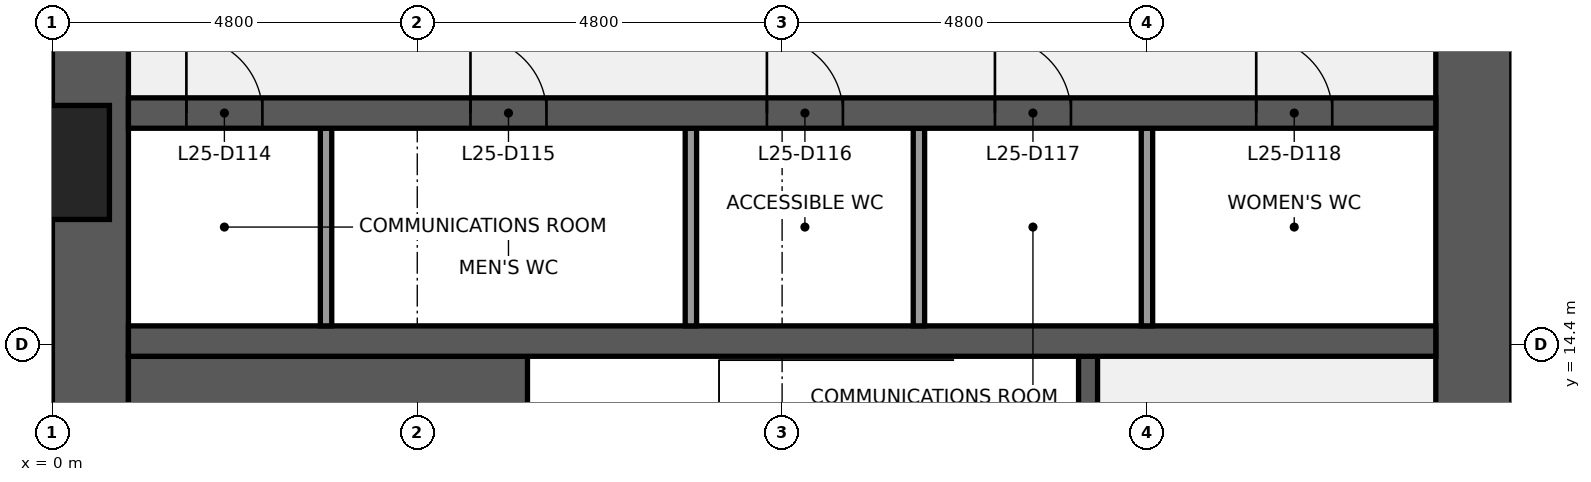
"""IFC4 building model, lengths in metres.
Left out: names, types, materials, properties, quantities, classifications, styles, units other than length and angle.
Written with IfcOpenShell. Run it as: python <this file> out.ifc"""

import sys

from ifc_helpers import new_model, si_unit, direction, frame, frame_2d, origin, place, context, subcontext, project, spatial, rectangle, extrude, element, fill, save


model = new_model("IFC4")
c1 = context("Model", 3, precision=1e-05, world=origin(), true_north=direction((0.0, 1.0)))
c2 = subcontext(c1, "Body", "Model", "MODEL_VIEW")
j1 = project(units=[si_unit("LENGTHUNIT", "METRE"), si_unit("PLANEANGLEUNIT", "RADIAN")], contexts=[c1])
p1 = place(None, origin())
s1 = spatial("IfcSite", under=j1, at=p1, CompositionType="ELEMENT")
p2 = place(p1, origin())
s2 = spatial("IfcBuilding", under=s1, at=p2, CompositionType="ELEMENT")
p3 = place(p2, frame((0.0, 0.0, 120.1)))
s3 = spatial("IfcBuildingStorey", under=s2, at=p3, CompositionType="ELEMENT", Elevation=120.1)
p4 = place(p3, frame((0.5, 9.6, 0.0), z_axis=(0.0, 0.0, 1.0), x_axis=(0.0, 1.0, 0.0)))
e1 = element("IfcWall", 1, at=p4, inside=s3, PredefinedType="SHEAR", context=c2, shape_type="SweptSolid", body=[
    extrude(rectangle(XDim=28.8, YDim=1.0, at=frame_2d((14.4, 0.0))), origin(), (0.0, 0.0, 1.0), 3.84),
])
p5 = place(p4, frame((8.85, 0.0, 0.9)))
e2 = element("IfcOpeningElement", 2, at=p5, cuts=e1, PredefinedType="OPENING", context=c2, shape_type="SweptSolid", body=[
    extrude(rectangle(XDim=1.5, YDim=1.5, at=frame_2d((0.75, 0.75))), frame((0.0, 0.51, 0.0), z_axis=(0.0, -1.0, 0.0), x_axis=(1.0, 0.0, 0.0)), (0.0, 0.0, 1.0), 1.02),
])
p6 = place(p4, frame((18.45, 0.0, 0.9)))
e3 = element("IfcOpeningElement", 3, at=p6, cuts=e1, PredefinedType="OPENING", context=c2, shape_type="SweptSolid", body=[
    extrude(rectangle(XDim=1.5, YDim=1.5, at=frame_2d((0.75, 0.75))), frame((0.0, 0.51, 0.0), z_axis=(0.0, -1.0, 0.0), x_axis=(1.0, 0.0, 0.0)), (0.0, 0.0, 1.0), 1.02),
])
p7 = place(p3, frame((18.7, 38.4, 0.0), z_axis=(0.0, 0.0, 1.0), x_axis=(0.0, -1.0, 0.0)))
e4 = element("IfcWall", 4, at=p7, inside=s3, PredefinedType="SHEAR", context=c2, shape_type="SweptSolid", body=[
    extrude(rectangle(XDim=28.8, YDim=1.0, at=frame_2d((14.4, 0.0))), origin(), (0.0, 0.0, 1.0), 3.84),
])
p8 = place(p7, frame((18.3, 0.0, 0.0)))
e5 = element("IfcOpeningElement", 5, at=p8, cuts=e4, PredefinedType="OPENING", context=c2, shape_type="SweptSolid", body=[
    extrude(rectangle(XDim=1.8, YDim=2.1, at=frame_2d((0.9, 1.05))), frame((0.0, 0.51, 0.0), z_axis=(0.0, -1.0, 0.0), x_axis=(1.0, 0.0, 0.0)), (0.0, 0.0, 1.0), 1.02),
])
p9 = place(p7, frame((8.7, 0.0, 0.0)))
e6 = element("IfcOpeningElement", 6, at=p9, cuts=e4, PredefinedType="OPENING", context=c2, shape_type="SweptSolid", body=[
    extrude(rectangle(XDim=1.8, YDim=2.1, at=frame_2d((0.9, 1.05))), frame((0.0, 0.51, 0.0), z_axis=(0.0, -1.0, 0.0), x_axis=(1.0, 0.0, 0.0)), (0.0, 0.0, 1.0), 1.02),
])
p10 = place(p3, frame((1.0, 12.425, 0.0), z_axis=(0.0, 0.0, 1.0), x_axis=(1.0, 0.0, 0.0)))
e7 = element("IfcWall", 7, at=p10, inside=s3, PredefinedType="SHEAR", context=c2, shape_type="SweptSolid", body=[
    extrude(rectangle(XDim=5.25, YDim=3.65, at=frame_2d((2.625, 0.0))), origin(), (0.0, 0.0, 1.0), 3.84),
])
p11 = place(p3, frame((13.625, 10.8, 0.0), z_axis=(0.0, 0.0, 1.0), x_axis=(0.0, 1.0, 0.0)))
e8 = element("IfcWall", 8, at=p11, inside=s3, PredefinedType="SHEAR", context=c2, shape_type="SweptSolid", body=[
    extrude(rectangle(XDim=3.45, YDim=0.25, at=frame_2d((1.725, 0.0))), origin(), (0.0, 0.0, 1.0), 3.84),
])
p12 = place(p11, frame((1.175, 0.0, 0.0)))
e9 = element("IfcOpeningElement", 9, at=p12, cuts=e8, PredefinedType="OPENING", context=c2, shape_type="SweptSolid", body=[
    extrude(rectangle(XDim=1.1, YDim=2.1, at=frame_2d((0.55, 1.05))), frame((0.0, 0.135, 0.0), z_axis=(0.0, -1.0, 0.0), x_axis=(1.0, 0.0, 0.0)), (0.0, 0.0, 1.0), 0.27),
])
p13 = place(p3, frame((1.0, 14.45, 0.0), z_axis=(0.0, 0.0, 1.0), x_axis=(1.0, 0.0, 0.0)))
e10 = element("IfcWall", 10, at=p13, inside=s3, PredefinedType="SHEAR", context=c2, shape_type="SweptSolid", body=[
    extrude(rectangle(XDim=17.2, YDim=0.4, at=frame_2d((8.6, 0.0))), origin(), (0.0, 0.0, 1.0), 3.84),
])
for number, where, z_axis, x_axis in (
    (11, (3.6, 14.65, 0.0), (0.0, 0.0, 1.0), (0.0, 1.0, 0.0)),
    (12, (8.4, 14.65, 0.0), (0.0, 0.0, 1.0), (0.0, 1.0, 0.0)),
    (13, (11.4, 14.65, 0.0), (0.0, 0.0, 1.0), (0.0, 1.0, 0.0)),
    (14, (14.4, 14.65, 0.0), (0.0, 0.0, 1.0), (0.0, 1.0, 0.0)),
):
    element("IfcWall", number, at=place(p3, frame(where, z_axis=z_axis, x_axis=x_axis)), inside=s3, PredefinedType="PARTITIONING", context=c2, shape_type="SweptSolid", body=[
        extrude(rectangle(XDim=2.6, YDim=0.15, at=frame_2d((1.3, 0.0))), origin(), (0.0, 0.0, 1.0), 3.84),
    ])
p14 = place(p3, frame((1.0, 17.45, 0.0), z_axis=(0.0, 0.0, 1.0), x_axis=(1.0, 0.0, 0.0)))
e15 = element("IfcWall", 15, at=p14, inside=s3, PredefinedType="SHEAR", context=c2, shape_type="SweptSolid", body=[
    extrude(rectangle(XDim=17.2, YDim=0.4, at=frame_2d((8.6, 0.0))), origin(), (0.0, 0.0, 1.0), 3.84),
])
p15 = place(p14, frame((0.762, 0.0, 0.0)))
e16 = element("IfcOpeningElement", 16, at=p15, cuts=e15, PredefinedType="OPENING", context=c2, shape_type="SweptSolid", body=[
    extrude(rectangle(XDim=1.0, YDim=2.1, at=frame_2d((0.5, 1.05))), frame((0.0, 0.21, 0.0), z_axis=(0.0, -1.0, 0.0), x_axis=(1.0, 0.0, 0.0)), (0.0, 0.0, 1.0), 0.42),
])
p16 = place(p14, frame((4.5, 0.0, 0.0)))
e17 = element("IfcOpeningElement", 17, at=p16, cuts=e15, PredefinedType="OPENING", context=c2, shape_type="SweptSolid", body=[
    extrude(rectangle(XDim=1.0, YDim=2.1, at=frame_2d((0.5, 1.05))), frame((0.0, 0.21, 0.0), z_axis=(0.0, -1.0, 0.0), x_axis=(1.0, 0.0, 0.0)), (0.0, 0.0, 1.0), 0.42),
])
p17 = place(p14, frame((8.4, 0.0, 0.0)))
e18 = element("IfcOpeningElement", 18, at=p17, cuts=e15, PredefinedType="OPENING", context=c2, shape_type="SweptSolid", body=[
    extrude(rectangle(XDim=1.0, YDim=2.1, at=frame_2d((0.5, 1.05))), frame((0.0, 0.21, 0.0), z_axis=(0.0, -1.0, 0.0), x_axis=(1.0, 0.0, 0.0)), (0.0, 0.0, 1.0), 0.42),
])
p18 = place(p14, frame((11.4, 0.0, 0.0)))
e19 = element("IfcOpeningElement", 19, at=p18, cuts=e15, PredefinedType="OPENING", context=c2, shape_type="SweptSolid", body=[
    extrude(rectangle(XDim=1.0, YDim=2.1, at=frame_2d((0.5, 1.05))), frame((0.0, 0.21, 0.0), z_axis=(0.0, -1.0, 0.0), x_axis=(1.0, 0.0, 0.0)), (0.0, 0.0, 1.0), 0.42),
])
p19 = place(p14, frame((14.837, 0.0, 0.0)))
e20 = element("IfcOpeningElement", 20, at=p19, cuts=e15, PredefinedType="OPENING", context=c2, shape_type="SweptSolid", body=[
    extrude(rectangle(XDim=1.0, YDim=2.1, at=frame_2d((0.5, 1.05))), frame((0.0, 0.21, 0.0), z_axis=(0.0, -1.0, 0.0), x_axis=(1.0, 0.0, 0.0)), (0.0, 0.0, 1.0), 0.42),
])
p20 = place(p15, origin())
e21 = element("IfcDoor", 21, at=p20, inside=s3, OperationType="SINGLE_SWING_LEFT", PredefinedType="DOOR", context=c2, shape_type="SweptSolid", body=[
    extrude(rectangle(XDim=1.0, YDim=2.1, at=frame_2d((0.5, 1.05))), frame((0.0, 0.025, 0.0), z_axis=(0.0, -1.0, 0.0), x_axis=(1.0, 0.0, 0.0)), (0.0, 0.0, 1.0), 0.05),
])
fill(e16, e21)
p21 = place(p16, origin())
e22 = element("IfcDoor", 22, at=p21, inside=s3, OperationType="SINGLE_SWING_LEFT", PredefinedType="DOOR", context=c2, shape_type="SweptSolid", body=[
    extrude(rectangle(XDim=1.0, YDim=2.1, at=frame_2d((0.5, 1.05))), frame((0.0, 0.025, 0.0), z_axis=(0.0, -1.0, 0.0), x_axis=(1.0, 0.0, 0.0)), (0.0, 0.0, 1.0), 0.05),
])
fill(e17, e22)
p22 = place(p17, origin())
e23 = element("IfcDoor", 23, at=p22, inside=s3, OperationType="SINGLE_SWING_LEFT", PredefinedType="DOOR", context=c2, shape_type="SweptSolid", body=[
    extrude(rectangle(XDim=1.0, YDim=2.1, at=frame_2d((0.5, 1.05))), frame((0.0, 0.025, 0.0), z_axis=(0.0, -1.0, 0.0), x_axis=(1.0, 0.0, 0.0)), (0.0, 0.0, 1.0), 0.05),
])
fill(e18, e23)
p23 = place(p18, origin())
e24 = element("IfcDoor", 24, at=p23, inside=s3, OperationType="SINGLE_SWING_LEFT", PredefinedType="DOOR", context=c2, shape_type="SweptSolid", body=[
    extrude(rectangle(XDim=1.0, YDim=2.1, at=frame_2d((0.5, 1.05))), frame((0.0, 0.025, 0.0), z_axis=(0.0, -1.0, 0.0), x_axis=(1.0, 0.0, 0.0)), (0.0, 0.0, 1.0), 0.05),
])
fill(e19, e24)
p24 = place(p19, origin())
e25 = element("IfcDoor", 25, at=p24, inside=s3, OperationType="SINGLE_SWING_LEFT", PredefinedType="DOOR", context=c2, shape_type="SweptSolid", body=[
    extrude(rectangle(XDim=1.0, YDim=2.1, at=frame_2d((0.5, 1.05))), frame((0.0, 0.025, 0.0), z_axis=(0.0, -1.0, 0.0), x_axis=(1.0, 0.0, 0.0)), (0.0, 0.0, 1.0), 0.05),
])
fill(e20, e25)
save(model, sys.argv[1])
